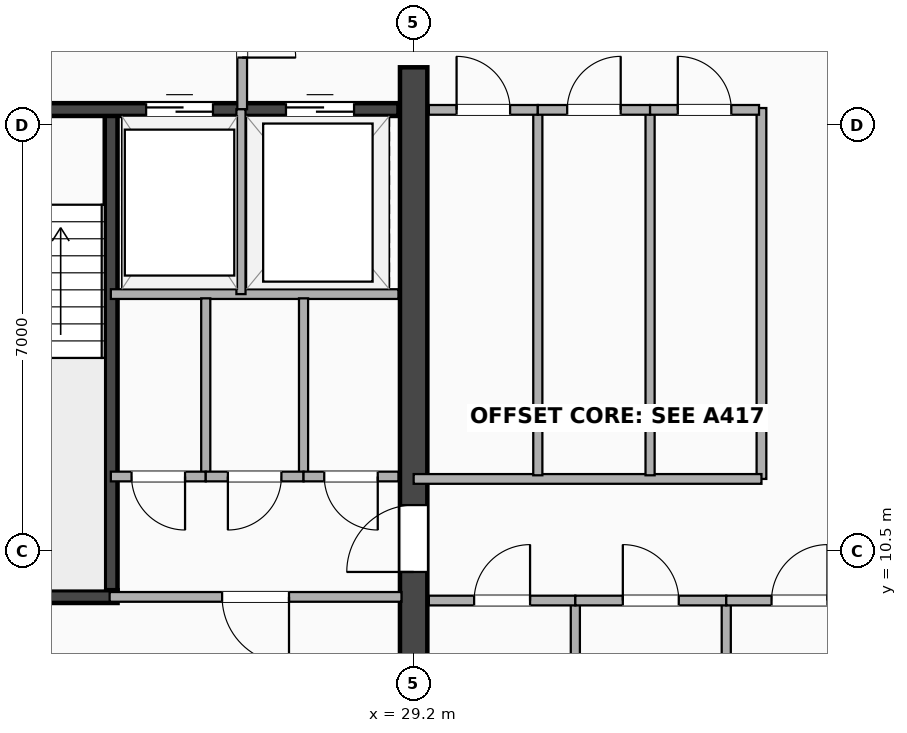
"""IFC4 building model, lengths in metres.
Left out: names, types, materials, properties, quantities, classifications, styles, units other than length and angle.
Written with IfcOpenShell. Run it as: python <this file> out.ifc"""

import sys

from ifc_helpers import new_model, si_unit, direction, frame, frame_2d, origin, place, context, subcontext, project, spatial, rectangle, extrude, element, fill, save


model = new_model("IFC4")
c1 = context("Model", 3, precision=1e-05, world=origin(), true_north=direction((0.0, 1.0)))
c2 = subcontext(c1, "Body", "Model", "MODEL_VIEW")
j1 = project(units=[si_unit("LENGTHUNIT", "METRE"), si_unit("PLANEANGLEUNIT", "RADIAN")], contexts=[c1])
p1 = place(None, origin())
s1 = spatial("IfcSite", under=j1, at=p1, CompositionType="ELEMENT")
p2 = place(p1, origin())
s2 = spatial("IfcBuilding", under=s1, at=p2, CompositionType="ELEMENT")
p3 = place(p2, frame((0.0, 0.0, 224.9)))
s3 = spatial("IfcBuildingStorey", under=s2, at=p3, CompositionType="ELEMENT", Elevation=224.9)
p4 = place(p3, frame((29.2, 3.5, 0.0), z_axis=(0.0, 0.0, 1.0), x_axis=(0.0, 1.0, 0.0)))
e1 = element("IfcWall", 1, at=p4, inside=s3, PredefinedType="SHEAR", context=c2, shape_type="SweptSolid", body=[
    extrude(rectangle(XDim=14.95, YDim=0.45, at=frame_2d((7.475, 0.0))), origin(), (0.0, 0.0, 1.0), 3.26),
])
p5 = place(p4, frame((7.75, 0.0, 0.0), z_axis=(0.0, 0.0, 1.0), x_axis=(-1.0, 0.0, 0.0)))
e2 = element("IfcOpeningElement", 2, at=p5, cuts=e1, PredefinedType="OPENING", context=c2, shape_type="SweptSolid", body=[
    extrude(rectangle(XDim=1.1, YDim=2.15, at=frame_2d((0.55, 1.075))), frame((0.0, 0.235, 0.0), z_axis=(0.0, -1.0, 0.0), x_axis=(1.0, 0.0, 0.0)), (0.0, 0.0, 1.0), 0.47),
])
p6 = place(p3, frame((24.225, 9.745, 0.0), z_axis=(0.0, 0.0, 1.0), x_axis=(0.0, 1.0, 0.0)))
e3 = element("IfcWall", 3, at=p6, inside=s3, PredefinedType="SHEAR", context=c2, shape_type="SweptSolid", body=[
    extrude(rectangle(XDim=8.01, YDim=0.21, at=frame_2d((4.005, 0.0))), origin(), (0.0, 0.0, 1.0), 3.26),
])
p7 = place(p3, frame((20.67, 9.745, 0.0), z_axis=(0.0, 0.0, 1.0), x_axis=(1.0, 0.0, 0.0)))
e4 = element("IfcWall", 4, at=p7, inside=s3, PredefinedType="SHEAR", context=c2, shape_type="SweptSolid", body=[
    extrude(rectangle(XDim=3.66, YDim=0.21, at=frame_2d((1.83, 0.0))), origin(), (0.0, 0.0, 1.0), 3.26),
])
p8 = place(p3, frame((20.65, 17.755, 0.0), z_axis=(0.0, 0.0, 1.0), x_axis=(1.0, 0.0, 0.0)))
e5 = element("IfcWall", 5, at=p8, inside=s3, PredefinedType="SHEAR", context=c2, shape_type="SweptSolid", body=[
    extrude(rectangle(XDim=8.3, YDim=0.21, at=frame_2d((4.15, 0.0))), origin(), (0.0, 0.0, 1.0), 3.26),
])
p9 = place(p8, frame((2.2, 0.0, 0.0), z_axis=(0.0, 0.0, 1.0), x_axis=(-1.0, 0.0, 0.0)))
e6 = element("IfcOpeningElement", 6, at=p9, cuts=e5, PredefinedType="OPENING", context=c2, shape_type="SweptSolid", body=[
    extrude(rectangle(XDim=1.05, YDim=2.15, at=frame_2d((0.525, 1.075))), frame((0.0, 0.115, 0.0), z_axis=(0.0, -1.0, 0.0), x_axis=(1.0, 0.0, 0.0)), (0.0, 0.0, 1.0), 0.23),
])
p10 = place(p8, frame((4.15, 0.0, 0.0)))
e7 = element("IfcOpeningElement", 7, at=p10, cuts=e5, PredefinedType="OPENING", context=c2, shape_type="SweptSolid", body=[
    extrude(rectangle(XDim=1.1, YDim=2.18, at=frame_2d((0.55, 1.09))), frame((0.0, 0.115, 0.0), z_axis=(0.0, -1.0, 0.0), x_axis=(1.0, 0.0, 0.0)), (0.0, 0.0, 1.0), 0.23),
])
p11 = place(p8, frame((6.45, 0.0, 0.0)))
e8 = element("IfcOpeningElement", 8, at=p11, cuts=e5, PredefinedType="OPENING", context=c2, shape_type="SweptSolid", body=[
    extrude(rectangle(XDim=1.12, YDim=2.2, at=frame_2d((0.56, 1.1))), frame((0.0, 0.115, 0.0), z_axis=(0.0, -1.0, 0.0), x_axis=(1.0, 0.0, 0.0)), (0.0, 0.0, 1.0), 0.23),
])
p12 = place(p3, frame((26.38, 17.76, 0.0), z_axis=(0.0, 0.0, 1.0), x_axis=(0.0, 1.0, 0.0)))
e9 = element("IfcWall", 9, at=p12, inside=s3, PredefinedType="PARTITIONING", context=c2, shape_type="SweptSolid", body=[
    extrude(rectangle(XDim=2.66, YDim=0.16, at=frame_2d((1.33, 0.0))), origin(), (0.0, 0.0, 1.0), 2.706),
])
p13 = place(p12, frame((0.85, 0.0, 0.0)))
e10 = element("IfcOpeningElement", 10, at=p13, cuts=e9, PredefinedType="OPENING", context=c2, shape_type="SweptSolid", body=[
    extrude(rectangle(XDim=0.88, YDim=2.08, at=frame_2d((0.44, 1.04))), frame((0.0, 0.09, 0.0), z_axis=(0.0, -1.0, 0.0), x_axis=(1.0, 0.0, 0.0)), (0.0, 0.0, 1.0), 0.18),
])
p14 = place(p3, frame((24.22, 14.72, 0.0), z_axis=(0.0, 0.0, 1.0), x_axis=(1.0, 0.0, 0.0)))
e11 = element("IfcWall", 11, at=p14, inside=s3, PredefinedType="PARTITIONING", context=c2, shape_type="SweptSolid", body=[
    extrude(rectangle(XDim=4.73, YDim=0.16, at=frame_2d((2.365, 0.0))), origin(), (0.0, 0.0, 1.0), 3.26),
])
p15 = place(p3, frame((26.36, 14.72, 0.0), z_axis=(0.0, 0.0, 1.0), x_axis=(0.0, 1.0, 0.0)))
e12 = element("IfcWall", 12, at=p15, inside=s3, PredefinedType="PARTITIONING", context=c2, shape_type="SweptSolid", body=[
    extrude(rectangle(XDim=3.04, YDim=0.15, at=frame_2d((1.52, 0.0))), origin(), (0.0, 0.0, 1.0), 3.26),
])
p16 = place(p3, frame((25.781, 11.72, 0.0), z_axis=(0.0, 0.0, 1.0), x_axis=(0.0, 1.0, 0.0)))
e13 = element("IfcWall", 13, at=p16, inside=s3, PredefinedType="PARTITIONING", context=c2, shape_type="SweptSolid", body=[
    extrude(rectangle(XDim=2.93, YDim=0.15, at=frame_2d((1.465, 0.0))), origin(), (0.0, 0.0, 1.0), 3.26),
])
p17 = place(p3, frame((24.22, 11.72, 0.0), z_axis=(0.0, 0.0, 1.0), x_axis=(1.0, 0.0, 0.0)))
e14 = element("IfcWall", 14, at=p17, inside=s3, PredefinedType="PARTITIONING", context=c2, shape_type="SweptSolid", body=[
    extrude(rectangle(XDim=1.561, YDim=0.16, at=frame_2d((0.781, 0.0))), origin(), (0.0, 0.0, 1.0), 3.26),
])
p18 = place(p17, frame((0.341, 0.0, 0.0)))
e15 = element("IfcOpeningElement", 15, at=p18, cuts=e14, PredefinedType="OPENING", context=c2, shape_type="SweptSolid", body=[
    extrude(rectangle(XDim=0.88, YDim=2.08, at=frame_2d((0.44, 1.04))), frame((0.0, 0.09, 0.0), z_axis=(0.0, -1.0, 0.0), x_axis=(1.0, 0.0, 0.0)), (0.0, 0.0, 1.0), 0.18),
])
p19 = place(p3, frame((27.389, 11.72, 0.0), z_axis=(0.0, 0.0, 1.0), x_axis=(0.0, 1.0, 0.0)))
e16 = element("IfcWall", 16, at=p19, inside=s3, PredefinedType="PARTITIONING", context=c2, shape_type="SweptSolid", body=[
    extrude(rectangle(XDim=2.93, YDim=0.15, at=frame_2d((1.465, 0.0))), origin(), (0.0, 0.0, 1.0), 3.26),
])
p20 = place(p3, frame((25.781, 11.72, 0.0), z_axis=(0.0, 0.0, 1.0), x_axis=(1.0, 0.0, 0.0)))
e17 = element("IfcWall", 17, at=p20, inside=s3, PredefinedType="PARTITIONING", context=c2, shape_type="SweptSolid", body=[
    extrude(rectangle(XDim=1.608, YDim=0.16, at=frame_2d((0.804, 0.0))), origin(), (0.0, 0.0, 1.0), 3.26),
])
p21 = place(p20, frame((0.364, 0.0, 0.0)))
e18 = element("IfcOpeningElement", 18, at=p21, cuts=e17, PredefinedType="OPENING", context=c2, shape_type="SweptSolid", body=[
    extrude(rectangle(XDim=0.88, YDim=2.08, at=frame_2d((0.44, 1.04))), frame((0.0, 0.09, 0.0), z_axis=(0.0, -1.0, 0.0), x_axis=(1.0, 0.0, 0.0)), (0.0, 0.0, 1.0), 0.18),
])
p22 = place(p3, frame((27.389, 11.72, 0.0), z_axis=(0.0, 0.0, 1.0), x_axis=(1.0, 0.0, 0.0)))
e19 = element("IfcWall", 19, at=p22, inside=s3, PredefinedType="PARTITIONING", context=c2, shape_type="SweptSolid", body=[
    extrude(rectangle(XDim=1.561, YDim=0.16, at=frame_2d((0.78, 0.0))), origin(), (0.0, 0.0, 1.0), 3.26),
])
p23 = place(p22, frame((0.341, 0.0, 0.0)))
e20 = element("IfcOpeningElement", 20, at=p23, cuts=e19, PredefinedType="OPENING", context=c2, shape_type="SweptSolid", body=[
    extrude(rectangle(XDim=0.88, YDim=2.08, at=frame_2d((0.44, 1.04))), frame((0.0, 0.09, 0.0), z_axis=(0.0, -1.0, 0.0), x_axis=(1.0, 0.0, 0.0)), (0.0, 0.0, 1.0), 0.18),
])
p24 = place(p3, frame((24.2, 9.74, 0.0), z_axis=(0.0, 0.0, 1.0), x_axis=(1.0, 0.0, 0.0)))
e21 = element("IfcWall", 21, at=p24, inside=s3, PredefinedType="PARTITIONING", context=c2, shape_type="SweptSolid", body=[
    extrude(rectangle(XDim=4.8, YDim=0.16, at=frame_2d((2.4, 0.0))), origin(), (0.0, 0.0, 1.0), 3.26),
])
p25 = place(p24, frame((1.85, 0.0, 0.0)))
e22 = element("IfcOpeningElement", 22, at=p25, cuts=e21, PredefinedType="OPENING", context=c2, shape_type="SweptSolid", body=[
    extrude(rectangle(XDim=1.1, YDim=2.15, at=frame_2d((0.55, 1.075))), frame((0.0, 0.09, 0.0), z_axis=(0.0, -1.0, 0.0), x_axis=(1.0, 0.0, 0.0)), (0.0, 0.0, 1.0), 0.18),
])
p26 = place(p3, frame((34.92, 11.68, 0.0), z_axis=(0.0, 0.0, 1.0), x_axis=(0.0, 1.0, 0.0)))
e23 = element("IfcWall", 23, at=p26, inside=s3, PredefinedType="PARTITIONING", context=c2, shape_type="SweptSolid", body=[
    extrude(rectangle(XDim=6.1, YDim=0.16, at=frame_2d((3.05, 0.0))), origin(), (0.0, 0.0, 1.0), 3.26),
])
p27 = place(p3, frame((31.859, 3.95, 0.0), z_axis=(0.0, 0.0, 1.0), x_axis=(0.0, 1.0, 0.0)))
e24 = element("IfcWall", 24, at=p27, inside=s3, PredefinedType="PARTITIONING", context=c2, shape_type="SweptSolid", body=[
    extrude(rectangle(XDim=5.73, YDim=0.15, at=frame_2d((2.865, 0.0))), origin(), (0.0, 0.0, 1.0), 3.26),
])
p28 = place(p3, frame((29.45, 9.68, 0.0), z_axis=(0.0, 0.0, 1.0), x_axis=(1.0, 0.0, 0.0)))
e25 = element("IfcWall", 25, at=p28, inside=s3, PredefinedType="PARTITIONING", context=c2, shape_type="SweptSolid", body=[
    extrude(rectangle(XDim=2.409, YDim=0.16, at=frame_2d((1.205, 0.0))), origin(), (0.0, 0.0, 1.0), 3.26),
])
p29 = place(p28, frame((1.664, 0.0, 0.0), z_axis=(0.0, 0.0, 1.0), x_axis=(-1.0, 0.0, 0.0)))
e26 = element("IfcOpeningElement", 26, at=p29, cuts=e25, PredefinedType="OPENING", context=c2, shape_type="SweptSolid", body=[
    extrude(rectangle(XDim=0.92, YDim=2.08, at=frame_2d((0.46, 1.04))), frame((0.0, 0.09, 0.0), z_axis=(0.0, -1.0, 0.0), x_axis=(1.0, 0.0, 0.0)), (0.0, 0.0, 1.0), 0.18),
])
p30 = place(p3, frame((34.341, 3.95, 0.0), z_axis=(0.0, 0.0, 1.0), x_axis=(0.0, 1.0, 0.0)))
e27 = element("IfcWall", 27, at=p30, inside=s3, PredefinedType="PARTITIONING", context=c2, shape_type="SweptSolid", body=[
    extrude(rectangle(XDim=5.73, YDim=0.15, at=frame_2d((2.865, 0.0))), origin(), (0.0, 0.0, 1.0), 3.26),
])
p31 = place(p3, frame((31.859, 9.68, 0.0), z_axis=(0.0, 0.0, 1.0), x_axis=(1.0, 0.0, 0.0)))
e28 = element("IfcWall", 28, at=p31, inside=s3, PredefinedType="PARTITIONING", context=c2, shape_type="SweptSolid", body=[
    extrude(rectangle(XDim=2.482, YDim=0.16, at=frame_2d((1.241, 0.0))), origin(), (0.0, 0.0, 1.0), 3.26),
])
p32 = place(p31, frame((1.701, 0.0, 0.0), z_axis=(0.0, 0.0, 1.0), x_axis=(-1.0, 0.0, 0.0)))
e29 = element("IfcOpeningElement", 29, at=p32, cuts=e28, PredefinedType="OPENING", context=c2, shape_type="SweptSolid", body=[
    extrude(rectangle(XDim=0.92, YDim=2.08, at=frame_2d((0.46, 1.04))), frame((0.0, 0.09, 0.0), z_axis=(0.0, -1.0, 0.0), x_axis=(1.0, 0.0, 0.0)), (0.0, 0.0, 1.0), 0.18),
])
p33 = place(p3, frame((34.341, 9.68, 0.0), z_axis=(0.0, 0.0, 1.0), x_axis=(1.0, 0.0, 0.0)))
e30 = element("IfcWall", 30, at=p33, inside=s3, PredefinedType="PARTITIONING", context=c2, shape_type="SweptSolid", body=[
    extrude(rectangle(XDim=2.409, YDim=0.16, at=frame_2d((1.205, 0.0))), origin(), (0.0, 0.0, 1.0), 3.26),
])
p34 = place(p33, frame((1.664, 0.0, 0.0), z_axis=(0.0, 0.0, 1.0), x_axis=(-1.0, 0.0, 0.0)))
e31 = element("IfcOpeningElement", 31, at=p34, cuts=e30, PredefinedType="OPENING", context=c2, shape_type="SweptSolid", body=[
    extrude(rectangle(XDim=0.92, YDim=2.08, at=frame_2d((0.46, 1.04))), frame((0.0, 0.09, 0.0), z_axis=(0.0, -1.0, 0.0), x_axis=(1.0, 0.0, 0.0)), (0.0, 0.0, 1.0), 0.18),
])
p35 = place(p3, frame((29.2, 11.68, 0.0), z_axis=(0.0, 0.0, 1.0), x_axis=(1.0, 0.0, 0.0)))
e32 = element("IfcWall", 32, at=p35, inside=s3, PredefinedType="PARTITIONING", context=c2, shape_type="SweptSolid", body=[
    extrude(rectangle(XDim=5.72, YDim=0.16, at=frame_2d((2.86, 0.0))), origin(), (0.0, 0.0, 1.0), 3.26),
])
p36 = place(p3, frame((31.242, 11.74, 0.0), z_axis=(0.0, 0.0, 1.0), x_axis=(0.0, 1.0, 0.0)))
e33 = element("IfcWall", 33, at=p36, inside=s3, PredefinedType="PARTITIONING", context=c2, shape_type="SweptSolid", body=[
    extrude(rectangle(XDim=6.01, YDim=0.15, at=frame_2d((3.005, 0.0))), origin(), (0.0, 0.0, 1.0), 3.26),
])
p37 = place(p3, frame((29.45, 17.75, 0.0), z_axis=(0.0, 0.0, 1.0), x_axis=(1.0, 0.0, 0.0)))
e34 = element("IfcWall", 34, at=p37, inside=s3, PredefinedType="PARTITIONING", context=c2, shape_type="SweptSolid", body=[
    extrude(rectangle(XDim=1.792, YDim=0.16, at=frame_2d((0.896, 0.0))), origin(), (0.0, 0.0, 1.0), 3.26),
])
p38 = place(p37, frame((1.336, 0.0, 0.0), z_axis=(0.0, 0.0, 1.0), x_axis=(-1.0, 0.0, 0.0)))
e35 = element("IfcOpeningElement", 35, at=p38, cuts=e34, PredefinedType="OPENING", context=c2, shape_type="SweptSolid", body=[
    extrude(rectangle(XDim=0.88, YDim=2.08, at=frame_2d((0.44, 1.04))), frame((0.0, 0.09, 0.0), z_axis=(0.0, -1.0, 0.0), x_axis=(1.0, 0.0, 0.0)), (0.0, 0.0, 1.0), 0.18),
])
p39 = place(p3, frame((33.088, 11.74, 0.0), z_axis=(0.0, 0.0, 1.0), x_axis=(0.0, 1.0, 0.0)))
e36 = element("IfcWall", 36, at=p39, inside=s3, PredefinedType="PARTITIONING", context=c2, shape_type="SweptSolid", body=[
    extrude(rectangle(XDim=6.01, YDim=0.15, at=frame_2d((3.005, 0.0))), origin(), (0.0, 0.0, 1.0), 3.26),
])
p40 = place(p3, frame((31.242, 17.75, 0.0), z_axis=(0.0, 0.0, 1.0), x_axis=(1.0, 0.0, 0.0)))
e37 = element("IfcWall", 37, at=p40, inside=s3, PredefinedType="PARTITIONING", context=c2, shape_type="SweptSolid", body=[
    extrude(rectangle(XDim=1.846, YDim=0.16, at=frame_2d((0.923, 0.0))), origin(), (0.0, 0.0, 1.0), 3.26),
])
p41 = place(p40, frame((1.363, 0.0, 0.0), z_axis=(0.0, 0.0, 1.0), x_axis=(-1.0, 0.0, 0.0)))
e38 = element("IfcOpeningElement", 38, at=p41, cuts=e37, PredefinedType="OPENING", context=c2, shape_type="SweptSolid", body=[
    extrude(rectangle(XDim=0.88, YDim=2.08, at=frame_2d((0.44, 1.04))), frame((0.0, 0.09, 0.0), z_axis=(0.0, -1.0, 0.0), x_axis=(1.0, 0.0, 0.0)), (0.0, 0.0, 1.0), 0.18),
])
p42 = place(p3, frame((33.088, 17.75, 0.0), z_axis=(0.0, 0.0, 1.0), x_axis=(1.0, 0.0, 0.0)))
e39 = element("IfcWall", 39, at=p42, inside=s3, PredefinedType="PARTITIONING", context=c2, shape_type="SweptSolid", body=[
    extrude(rectangle(XDim=1.792, YDim=0.16, at=frame_2d((0.896, 0.0))), origin(), (0.0, 0.0, 1.0), 3.26),
])
p43 = place(p42, frame((1.336, 0.0, 0.0), z_axis=(0.0, 0.0, 1.0), x_axis=(-1.0, 0.0, 0.0)))
e40 = element("IfcOpeningElement", 40, at=p43, cuts=e39, PredefinedType="OPENING", context=c2, shape_type="SweptSolid", body=[
    extrude(rectangle(XDim=0.88, YDim=2.08, at=frame_2d((0.44, 1.04))), frame((0.0, 0.09, 0.0), z_axis=(0.0, -1.0, 0.0), x_axis=(1.0, 0.0, 0.0)), (0.0, 0.0, 1.0), 0.18),
])
p44 = place(p10, origin())
e41 = element("IfcDoor", 41, at=p44, inside=s3, OperationType="DOUBLE_DOOR_SLIDING", PredefinedType="DOOR", context=c2, shape_type="SweptSolid", body=[
    extrude(rectangle(XDim=1.1, YDim=2.18, at=frame_2d((0.55, 1.09))), frame((0.0, 0.025, 0.0), z_axis=(0.0, -1.0, 0.0), x_axis=(1.0, 0.0, 0.0)), (0.0, 0.0, 1.0), 0.05),
])
fill(e7, e41)
p45 = place(p11, origin())
e42 = element("IfcDoor", 42, at=p45, inside=s3, OperationType="DOUBLE_DOOR_SLIDING", PredefinedType="DOOR", context=c2, shape_type="SweptSolid", body=[
    extrude(rectangle(XDim=1.12, YDim=2.2, at=frame_2d((0.56, 1.1))), frame((0.0, 0.025, 0.0), z_axis=(0.0, -1.0, 0.0), x_axis=(1.0, 0.0, 0.0)), (0.0, 0.0, 1.0), 0.05),
])
fill(e8, e42)
p46 = place(p5, origin())
e43 = element("IfcDoor", 43, at=p46, inside=s3, OperationType="SINGLE_SWING_LEFT", PredefinedType="DOOR", context=c2, shape_type="SweptSolid", body=[
    extrude(rectangle(XDim=1.1, YDim=2.15, at=frame_2d((0.55, 1.075))), frame((0.0, 0.025, 0.0), z_axis=(0.0, -1.0, 0.0), x_axis=(1.0, 0.0, 0.0)), (0.0, 0.0, 1.0), 0.05),
])
fill(e2, e43)
p47 = place(p13, origin())
e44 = element("IfcDoor", 44, at=p47, inside=s3, OperationType="SINGLE_SWING_LEFT", PredefinedType="DOOR", context=c2, shape_type="SweptSolid", body=[
    extrude(rectangle(XDim=0.88, YDim=2.08, at=frame_2d((0.44, 1.04))), frame((0.0, 0.025, 0.0), z_axis=(0.0, -1.0, 0.0), x_axis=(1.0, 0.0, 0.0)), (0.0, 0.0, 1.0), 0.05),
])
fill(e10, e44)
p48 = place(p18, origin())
e45 = element("IfcDoor", 45, at=p48, inside=s3, OperationType="SINGLE_SWING_RIGHT", PredefinedType="DOOR", context=c2, shape_type="SweptSolid", body=[
    extrude(rectangle(XDim=0.88, YDim=2.08, at=frame_2d((0.44, 1.04))), frame((0.0, 0.025, 0.0), z_axis=(0.0, -1.0, 0.0), x_axis=(1.0, 0.0, 0.0)), (0.0, 0.0, 1.0), 0.05),
])
fill(e15, e45)
p49 = place(p21, origin())
e46 = element("IfcDoor", 46, at=p49, inside=s3, OperationType="SINGLE_SWING_LEFT", PredefinedType="DOOR", context=c2, shape_type="SweptSolid", body=[
    extrude(rectangle(XDim=0.88, YDim=2.08, at=frame_2d((0.44, 1.04))), frame((0.0, 0.025, 0.0), z_axis=(0.0, -1.0, 0.0), x_axis=(1.0, 0.0, 0.0)), (0.0, 0.0, 1.0), 0.05),
])
fill(e18, e46)
p50 = place(p23, origin())
e47 = element("IfcDoor", 47, at=p50, inside=s3, OperationType="SINGLE_SWING_RIGHT", PredefinedType="DOOR", context=c2, shape_type="SweptSolid", body=[
    extrude(rectangle(XDim=0.88, YDim=2.08, at=frame_2d((0.44, 1.04))), frame((0.0, 0.025, 0.0), z_axis=(0.0, -1.0, 0.0), x_axis=(1.0, 0.0, 0.0)), (0.0, 0.0, 1.0), 0.05),
])
fill(e20, e47)
p51 = place(p25, origin())
e48 = element("IfcDoor", 48, at=p51, inside=s3, OperationType="SINGLE_SWING_RIGHT", PredefinedType="DOOR", context=c2, shape_type="SweptSolid", body=[
    extrude(rectangle(XDim=1.1, YDim=2.15, at=frame_2d((0.55, 1.075))), frame((0.0, 0.025, 0.0), z_axis=(0.0, -1.0, 0.0), x_axis=(1.0, 0.0, 0.0)), (0.0, 0.0, 1.0), 0.05),
])
fill(e22, e48)
p52 = place(p29, origin())
e49 = element("IfcDoor", 49, at=p52, inside=s3, OperationType="SINGLE_SWING_RIGHT", PredefinedType="DOOR", context=c2, shape_type="SweptSolid", body=[
    extrude(rectangle(XDim=0.92, YDim=2.08, at=frame_2d((0.46, 1.04))), frame((0.0, 0.025, 0.0), z_axis=(0.0, -1.0, 0.0), x_axis=(1.0, 0.0, 0.0)), (0.0, 0.0, 1.0), 0.05),
])
fill(e26, e49)
p53 = place(p32, origin())
e50 = element("IfcDoor", 50, at=p53, inside=s3, OperationType="SINGLE_SWING_LEFT", PredefinedType="DOOR", context=c2, shape_type="SweptSolid", body=[
    extrude(rectangle(XDim=0.92, YDim=2.08, at=frame_2d((0.46, 1.04))), frame((0.0, 0.025, 0.0), z_axis=(0.0, -1.0, 0.0), x_axis=(1.0, 0.0, 0.0)), (0.0, 0.0, 1.0), 0.05),
])
fill(e29, e50)
p54 = place(p34, origin())
e51 = element("IfcDoor", 51, at=p54, inside=s3, OperationType="SINGLE_SWING_RIGHT", PredefinedType="DOOR", context=c2, shape_type="SweptSolid", body=[
    extrude(rectangle(XDim=0.92, YDim=2.08, at=frame_2d((0.46, 1.04))), frame((0.0, 0.025, 0.0), z_axis=(0.0, -1.0, 0.0), x_axis=(1.0, 0.0, 0.0)), (0.0, 0.0, 1.0), 0.05),
])
fill(e31, e51)
p55 = place(p38, origin())
e52 = element("IfcDoor", 52, at=p55, inside=s3, OperationType="SINGLE_SWING_LEFT", PredefinedType="DOOR", context=c2, shape_type="SweptSolid", body=[
    extrude(rectangle(XDim=0.88, YDim=2.08, at=frame_2d((0.44, 1.04))), frame((0.0, 0.025, 0.0), z_axis=(0.0, -1.0, 0.0), x_axis=(1.0, 0.0, 0.0)), (0.0, 0.0, 1.0), 0.05),
])
fill(e35, e52)
p56 = place(p41, origin())
e53 = element("IfcDoor", 53, at=p56, inside=s3, OperationType="SINGLE_SWING_RIGHT", PredefinedType="DOOR", context=c2, shape_type="SweptSolid", body=[
    extrude(rectangle(XDim=0.88, YDim=2.08, at=frame_2d((0.44, 1.04))), frame((0.0, 0.025, 0.0), z_axis=(0.0, -1.0, 0.0), x_axis=(1.0, 0.0, 0.0)), (0.0, 0.0, 1.0), 0.05),
])
fill(e38, e53)
p57 = place(p43, origin())
e54 = element("IfcDoor", 54, at=p57, inside=s3, OperationType="SINGLE_SWING_LEFT", PredefinedType="DOOR", context=c2, shape_type="SweptSolid", body=[
    extrude(rectangle(XDim=0.88, YDim=2.08, at=frame_2d((0.44, 1.04))), frame((0.0, 0.025, 0.0), z_axis=(0.0, -1.0, 0.0), x_axis=(1.0, 0.0, 0.0)), (0.0, 0.0, 1.0), 0.05),
])
fill(e40, e54)
save(model, sys.argv[1])
